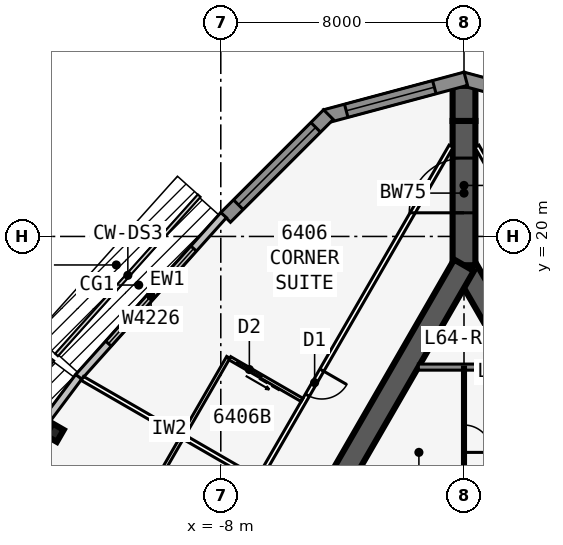
"""IFC4 building model, lengths in metres.
Left out: names, types, materials, properties, quantities, classifications, styles, units other than length and angle.
Written with IfcOpenShell. Run it as: python <this file> out.ifc"""

import sys

from ifc_helpers import new_model, si_unit, direction, frame, frame_2d, origin, origin_2d, place, context, subcontext, project, spatial, polyline, rectangle, i_section, outline, extrude, element, fill, save


model = new_model("IFC4")
c1 = context("Model", 3, precision=1e-05, world=origin(), true_north=direction((0.0, 1.0)))
c2 = subcontext(c1, "Body", "Model", "MODEL_VIEW")
j1 = project(units=[si_unit("LENGTHUNIT", "METRE"), si_unit("PLANEANGLEUNIT", "RADIAN")], contexts=[c1])
p1 = place(None, origin())
s1 = spatial("IfcSite", under=j1, at=p1, CompositionType="ELEMENT")
p2 = place(p1, origin())
s2 = spatial("IfcBuilding", under=s1, at=p2, CompositionType="ELEMENT")
p3 = place(p2, frame((0.0, 0.0, 242.9)))
s3 = spatial("IfcBuildingStorey", under=s2, at=p3, CompositionType="ELEMENT", Elevation=242.9)
p4 = place(p3, frame((16.5, -9.526, 0.0), z_axis=(0.0, 0.0, 1.0), x_axis=(-0.499999749417, 0.866025548458, 0.0)))
e1 = element("IfcWall", 1, at=p4, inside=s3, PredefinedType="SHEAR", context=c2, shape_type="SweptSolid", body=[
    extrude(rectangle(XDim=33.0, YDim=0.75, at=frame_2d((16.5, 0.0))), origin(), (0.0, 0.0, 1.0), 3.6),
])
p5 = place(p4, frame((14.15, 0.0, 0.0)))
e2 = element("IfcOpeningElement", 2, at=p5, cuts=e1, PredefinedType="OPENING", context=c2, shape_type="SweptSolid", body=[
    extrude(rectangle(XDim=1.8, YDim=2.13, at=frame_2d((0.9, 1.065))), frame((0.0, 0.385, 0.0), z_axis=(0.0, -1.0, 0.0), x_axis=(1.0, 0.0, 0.0)), (0.0, 0.0, 1.0), 0.77),
])
p6 = place(p4, frame((12.6, 0.0, 0.0)))
e3 = element("IfcOpeningElement", 3, at=p6, cuts=e1, PredefinedType="OPENING", context=c2, shape_type="SweptSolid", body=[
    extrude(rectangle(XDim=1.0, YDim=2.13, at=frame_2d((0.5, 1.065))), frame((0.0, 0.385, 0.0), z_axis=(0.0, -1.0, 0.0), x_axis=(1.0, 0.0, 0.0)), (0.0, 0.0, 1.0), 0.77),
])
p7 = place(p3, frame((0.0, 19.052, 0.0), z_axis=(0.0, 0.0, 1.0), x_axis=(-0.499999749417, -0.866025548458, 0.0)))
e4 = element("IfcWall", 4, at=p7, inside=s3, PredefinedType="SHEAR", context=c2, shape_type="SweptSolid", body=[
    extrude(rectangle(XDim=33.0, YDim=0.75, at=frame_2d((16.5, 0.0))), origin(), (0.0, 0.0, 1.0), 3.6),
])
p8 = place(p7, frame((14.15, 0.0, 0.0)))
e5 = element("IfcOpeningElement", 5, at=p8, cuts=e4, PredefinedType="OPENING", context=c2, shape_type="SweptSolid", body=[
    extrude(rectangle(XDim=1.8, YDim=2.13, at=frame_2d((0.9, 1.065))), frame((0.0, 0.385, 0.0), z_axis=(0.0, -1.0, 0.0), x_axis=(1.0, 0.0, 0.0)), (0.0, 0.0, 1.0), 0.77),
])
p9 = place(p7, frame((12.6, 0.0, 0.0)))
e6 = element("IfcOpeningElement", 6, at=p9, cuts=e4, PredefinedType="OPENING", context=c2, shape_type="SweptSolid", body=[
    extrude(rectangle(XDim=1.0, YDim=2.13, at=frame_2d((0.5, 1.065))), frame((0.0, 0.385, 0.0), z_axis=(0.0, -1.0, 0.0), x_axis=(1.0, 0.0, 0.0)), (0.0, 0.0, 1.0), 0.77),
])
p10 = place(p3, frame((0.0, 19.052, 0.0), z_axis=(0.0, 0.0, 1.0), x_axis=(0.0, 1.0, 0.0)))
e7 = element("IfcWall", 7, at=p10, inside=s3, PredefinedType="SHEAR", context=c2, shape_type="SweptSolid", body=[
    extrude(rectangle(XDim=4.746, YDim=0.75, at=frame_2d((2.373, 0.0))), origin(), (0.0, 0.0, 1.0), 3.6),
])
p11 = place(p10, frame((1.725, 0.0, 0.0)))
e8 = element("IfcOpeningElement", 8, at=p11, cuts=e7, PredefinedType="OPENING", context=c2, shape_type="SweptSolid", body=[
    extrude(rectangle(XDim=1.8, YDim=2.13, at=frame_2d((0.9, 1.065))), frame((0.0, 0.385, 0.0), z_axis=(0.0, -1.0, 0.0), x_axis=(1.0, 0.0, 0.0)), (0.0, 0.0, 1.0), 0.77),
])
p12 = place(p3, frame((0.0, 23.799, 0.0), z_axis=(0.0, 0.0, 1.0), x_axis=(0.0, 1.0, 0.0)))
e9 = element("IfcWall", 9, at=p12, inside=s3, PredefinedType="SHEAR", context=c2, shape_type="SweptSolid", body=[
    extrude(rectangle(XDim=1.155, YDim=0.75, at=frame_2d((0.577, 0.0))), origin(), (0.0, 0.0, 1.0), 3.6),
])
p13 = place(p3, frame((-13.461, 13.545, 0.0), z_axis=(0.0, 0.0, 1.0), x_axis=(-0.866025403784, 0.5, 0.0)))
e10 = element("IfcColumn", 10, at=p13, inside=s3, PredefinedType="COLUMN", context=c2, shape_type="SweptSolid", body=[
    extrude(i_section(OverallWidth=0.419, OverallDepth=0.455, WebThickness=0.042, FlangeThickness=0.068, at=origin_2d()), origin(), (0.0, 0.0, 1.0), 3.6),
])
p14 = place(p3, frame((4.561, 23.948, 0.0), z_axis=(0.0, 0.0, 1.0), x_axis=(-0.965926628191, 0.258816052347, 0.0)))
e11 = element("IfcWall", 11, at=p14, inside=s3, PredefinedType="SOLIDWALL", context=c2, shape_type="SweptSolid", body=[
    extrude(outline(polyline([(4.781, 0.225), (4.722, 0.225), (4.303, 0.113), (4.273, 0.225), (0.0, 0.225), (0.0, -0.225), (4.781, -0.225), (4.781, 0.225)])), origin(), (0.0, 0.0, 1.0), 3.435),
])
p15 = place(p14, frame((0.711, 0.0, 0.45)))
e12 = element("IfcOpeningElement", 12, at=p15, cuts=e11, PredefinedType="OPENING", context=c2, shape_type="SweptSolid", body=[
    extrude(rectangle(XDim=3.0, YDim=2.6, at=frame_2d((1.5, 1.3))), frame((0.0, 0.235, 0.0), z_axis=(0.0, -1.0, 0.0), x_axis=(1.0, 0.0, 0.0)), (0.0, 0.0, 1.0), 0.47),
])
p16 = place(p3, frame((0.058, 25.186, 0.0), z_axis=(0.0, 0.0, 1.0), x_axis=(-0.965926628191, -0.258816052347, 0.0)))
e13 = element("IfcWall", 13, at=p16, inside=s3, PredefinedType="SOLIDWALL", context=c2, shape_type="SweptSolid", body=[
    extrude(outline(polyline([(4.781, 0.225), (0.509, 0.225), (0.479, 0.113), (0.059, 0.225), (0.0, 0.225), (0.0, -0.225), (4.781, -0.225), (4.781, 0.225)])), origin(), (0.0, 0.0, 1.0), 3.435),
])
p17 = place(p16, frame((1.07, 0.0, 0.45)))
e14 = element("IfcOpeningElement", 14, at=p17, cuts=e13, PredefinedType="OPENING", context=c2, shape_type="SweptSolid", body=[
    extrude(rectangle(XDim=3.0, YDim=2.6, at=frame_2d((1.5, 1.3))), frame((0.0, 0.235, 0.0), z_axis=(0.0, -1.0, 0.0), x_axis=(1.0, 0.0, 0.0)), (0.0, 0.0, 1.0), 0.47),
])
p18 = place(p3, frame((-4.46, 24.007, 0.0), z_axis=(0.0, 0.0, 1.0), x_axis=(-0.707106781187, -0.707106781187, 0.0)))
e15 = element("IfcWall", 15, at=p18, inside=s3, PredefinedType="SOLIDWALL", context=c2, shape_type="SweptSolid", body=[
    extrude(rectangle(XDim=4.781, YDim=0.45, at=frame_2d((2.391, 0.0))), origin(), (0.0, 0.0, 1.0), 3.435),
])
p19 = place(p18, frame((0.591, 0.0, 0.45)))
e16 = element("IfcOpeningElement", 16, at=p19, cuts=e15, PredefinedType="OPENING", context=c2, shape_type="SweptSolid", body=[
    extrude(rectangle(XDim=3.6, YDim=2.6, at=frame_2d((1.8, 1.3))), frame((0.0, 0.235, 0.0), z_axis=(0.0, -1.0, 0.0), x_axis=(1.0, 0.0, 0.0)), (0.0, 0.0, 1.0), 0.47),
])
p20 = place(p3, frame((-7.907, 20.701, 0.0), z_axis=(0.0, 0.0, 1.0), x_axis=(-0.667303550892, -0.744785855778, 0.0)))
e17 = element("IfcWall", 17, at=p20, inside=s3, PredefinedType="STANDARD", context=c2, shape_type="SweptSolid", body=[
    extrude(rectangle(XDim=7.153, YDim=0.25, at=frame_2d((3.576, 0.0))), origin(), (0.0, 0.0, 1.0), 3.435),
])
p21 = place(p20, frame((1.476, 0.0, 0.45)))
e18 = element("IfcOpeningElement", 18, at=p21, cuts=e17, PredefinedType="OPENING", context=c2, shape_type="SweptSolid", body=[
    extrude(rectangle(XDim=4.2, YDim=2.6, at=frame_2d((2.1, 1.3))), frame((0.0, 0.135, 0.0), z_axis=(0.0, -1.0, 0.0), x_axis=(1.0, 0.0, 0.0)), (0.0, 0.0, 1.0), 0.27),
])
p22 = place(p3, frame((-12.673, 15.382, 0.0), z_axis=(0.0, 0.0, 1.0), x_axis=(-0.599650843534, -0.800261748335, 0.0)))
e19 = element("IfcWall", 19, at=p22, inside=s3, PredefinedType="STANDARD", context=c2, shape_type="SweptSolid", body=[
    extrude(rectangle(XDim=2.014, YDim=0.25, at=frame_2d((1.007, 0.0))), origin(), (0.0, 0.0, 1.0), 3.435),
])
p23 = place(p3, frame((6.763, 11.988, 0.0), z_axis=(0.0, 0.0, 1.0), x_axis=(-0.49999585592, 0.866027796357, 0.0)))
e20 = element("IfcWall", 20, at=p23, inside=s3, PredefinedType="PARTITIONING", context=c2, shape_type="SweptSolid", body=[
    extrude(rectangle(XDim=12.677, YDim=0.15, at=frame_2d((6.338, 0.0))), origin(), (0.0, 0.0, 1.0), 3.435),
])
p24 = place(p23, frame((3.225, 0.0, 0.0)))
e21 = element("IfcOpeningElement", 21, at=p24, cuts=e20, PredefinedType="OPENING", context=c2, shape_type="SweptSolid", body=[
    extrude(rectangle(XDim=0.95, YDim=2.13, at=frame_2d((0.475, 1.065))), frame((0.0, 0.085, 0.0), z_axis=(0.0, -1.0, 0.0), x_axis=(1.0, 0.0, 0.0)), (0.0, 0.0, 1.0), 0.17),
])
p25 = place(p3, frame((-0.425, 22.966, 0.0), z_axis=(0.0, 0.0, 1.0), x_axis=(-0.500000265775, -0.866025250339, 0.0)))
e22 = element("IfcWall", 22, at=p25, inside=s3, PredefinedType="PARTITIONING", context=c2, shape_type="SweptSolid", body=[
    extrude(rectangle(XDim=39.354, YDim=0.15, at=frame_2d((19.677, 0.0))), origin(), (0.0, 0.0, 1.0), 3.435),
])
p26 = place(p25, frame((8.502, 0.0, 0.0)))
e23 = element("IfcOpeningElement", 23, at=p26, cuts=e22, PredefinedType="OPENING", context=c2, shape_type="SweptSolid", body=[
    extrude(rectangle(XDim=0.95, YDim=2.13, at=frame_2d((0.475, 1.065))), frame((0.0, 0.085, 0.0), z_axis=(0.0, -1.0, 0.0), x_axis=(1.0, 0.0, 0.0)), (0.0, 0.0, 1.0), 0.17),
])
p27 = place(p25, frame((15.902, 0.0, 0.0)))
e24 = element("IfcOpeningElement", 24, at=p27, cuts=e22, PredefinedType="OPENING", context=c2, shape_type="SweptSolid", body=[
    extrude(rectangle(XDim=0.95, YDim=2.13, at=frame_2d((0.475, 1.065))), frame((0.0, 0.085, 0.0), z_axis=(0.0, -1.0, 0.0), x_axis=(1.0, 0.0, 0.0)), (0.0, 0.0, 1.0), 0.17),
])
p28 = place(p25, frame((22.902, 0.0, 0.0)))
e25 = element("IfcOpeningElement", 25, at=p28, cuts=e22, PredefinedType="OPENING", context=c2, shape_type="SweptSolid", body=[
    extrude(rectangle(XDim=0.95, YDim=2.13, at=frame_2d((0.475, 1.065))), frame((0.0, 0.085, 0.0), z_axis=(0.0, -1.0, 0.0), x_axis=(1.0, 0.0, 0.0)), (0.0, 0.0, 1.0), 0.17),
])
p29 = place(p25, frame((29.902, 0.0, 0.0)))
e26 = element("IfcOpeningElement", 26, at=p29, cuts=e22, PredefinedType="OPENING", context=c2, shape_type="SweptSolid", body=[
    extrude(rectangle(XDim=0.95, YDim=2.13, at=frame_2d((0.475, 1.065))), frame((0.0, 0.085, 0.0), z_axis=(0.0, -1.0, 0.0), x_axis=(1.0, 0.0, 0.0)), (0.0, 0.0, 1.0), 0.17),
])
p30 = place(p3, frame((-6.829, 12.025, 0.0), z_axis=(0.0, 0.0, 1.0), x_axis=(-0.866029323189, 0.499993211332, 0.0)))
e27 = element("IfcWall", 27, at=p30, inside=s3, PredefinedType="PARTITIONING", context=c2, shape_type="SweptSolid", body=[
    extrude(rectangle(XDim=6.608, YDim=0.15, at=frame_2d((3.304, 0.0))), origin(), (0.0, 0.0, 1.0), 2.678),
])
p31 = place(p3, frame((-7.753, 16.023, 0.0), z_axis=(0.0, 0.0, 1.0), x_axis=(-0.499990139034, -0.866031096941, 0.0)))
e28 = element("IfcWall", 28, at=p31, inside=s3, PredefinedType="PLUMBINGWALL", context=c2, shape_type="SweptSolid", body=[
    extrude(rectangle(XDim=3.0, YDim=0.12, at=frame_2d((1.5, 0.0))), origin(), (0.0, 0.0, 1.0), 3.435),
])
p32 = place(p3, frame((-5.329, 14.623, 0.0), z_axis=(0.0, 0.0, 1.0), x_axis=(-0.865997131366, 0.500048966069, 0.0)))
e29 = element("IfcWall", 29, at=p32, inside=s3, PredefinedType="PLUMBINGWALL", context=c2, shape_type="SweptSolid", body=[
    extrude(rectangle(XDim=2.74, YDim=0.12, at=frame_2d((1.37, 0.0))), origin(), (0.0, 0.0, 1.0), 3.435),
])
p33 = place(p32, frame((1.55, 0.0, 0.0)))
e30 = element("IfcOpeningElement", 30, at=p33, cuts=e29, PredefinedType="OPENING", context=c2, shape_type="SweptSolid", body=[
    extrude(rectangle(XDim=0.9, YDim=2.13, at=frame_2d((0.45, 1.065))), frame((0.0, 0.07, 0.0), z_axis=(0.0, -1.0, 0.0), x_axis=(1.0, 0.0, 0.0)), (0.0, 0.0, 1.0), 0.14),
])
p34 = place(p3, frame((-9.253, 13.425, 0.0), z_axis=(0.0, 0.0, 1.0), x_axis=(-0.499990139034, -0.866031096941, 0.0)))
e31 = element("IfcWall", 31, at=p34, inside=s3, PredefinedType="PLUMBINGWALL", context=c2, shape_type="SweptSolid", body=[
    extrude(rectangle(XDim=3.0, YDim=0.12, at=frame_2d((1.5, 0.0))), origin(), (0.0, 0.0, 1.0), 3.435),
])
p35 = place(p3, frame((-1.501, 15.703, 0.0), z_axis=(0.0, 0.0, 1.0), x_axis=(1.0, 0.0, 0.0)))
e32 = element("IfcWall", 32, at=p35, inside=s3, PredefinedType="SOLIDWALL", context=c2, shape_type="SweptSolid", body=[
    extrude(rectangle(XDim=3.002, YDim=0.2, at=frame_2d((1.501, 0.0))), origin(), (0.0, 0.0, 1.0), 3.435),
])
p36 = place(p3, frame((0.0, 15.703, 0.0), z_axis=(0.0, 0.0, 1.0), x_axis=(0.0, -1.0, 0.0)))
e33 = element("IfcWall", 33, at=p36, inside=s3, PredefinedType="PARTITIONING", context=c2, shape_type="SweptSolid", body=[
    extrude(rectangle(XDim=3.925, YDim=0.1, at=frame_2d((1.963, 0.0))), origin(), (0.0, 0.0, 1.0), 3.435),
])
p37 = place(p36, frame((1.905, 0.0, 0.0)))
e34 = element("IfcOpeningElement", 34, at=p37, cuts=e33, PredefinedType="OPENING", context=c2, shape_type="SweptSolid", body=[
    extrude(rectangle(XDim=0.9, YDim=2.13, at=frame_2d((0.45, 1.065))), frame((0.0, 0.06, 0.0), z_axis=(0.0, -1.0, 0.0), x_axis=(1.0, 0.0, 0.0)), (0.0, 0.0, 1.0), 0.12),
])
p38 = place(p17, origin())
e35 = element("IfcWindow", 35, at=p38, inside=s3, PartitioningType="SINGLE_PANEL", PredefinedType="WINDOW", context=c2, shape_type="SweptSolid", body=[
    extrude(rectangle(XDim=3.0, YDim=2.6, at=frame_2d((1.5, 1.3))), frame((0.0, 0.03, 0.0), z_axis=(0.0, -1.0, 0.0), x_axis=(1.0, 0.0, 0.0)), (0.0, 0.0, 1.0), 0.06),
])
fill(e14, e35)
p39 = place(p19, origin())
e36 = element("IfcWindow", 36, at=p39, inside=s3, PartitioningType="SINGLE_PANEL", PredefinedType="WINDOW", context=c2, shape_type="SweptSolid", body=[
    extrude(rectangle(XDim=3.6, YDim=2.6, at=frame_2d((1.8, 1.3))), frame((0.0, 0.03, 0.0), z_axis=(0.0, -1.0, 0.0), x_axis=(1.0, 0.0, 0.0)), (0.0, 0.0, 1.0), 0.06),
])
fill(e16, e36)
p40 = place(p21, origin())
e37 = element("IfcWindow", 37, at=p40, inside=s3, PartitioningType="SINGLE_PANEL", PredefinedType="WINDOW", context=c2, shape_type="SweptSolid", body=[
    extrude(rectangle(XDim=4.2, YDim=2.6, at=frame_2d((2.1, 1.3))), frame((0.0, 0.03, 0.0), z_axis=(0.0, -1.0, 0.0), x_axis=(1.0, 0.0, 0.0)), (0.0, 0.0, 1.0), 0.06),
])
fill(e18, e37)
p41 = place(p33, origin())
e38 = element("IfcDoor", 38, at=p41, inside=s3, OperationType="SLIDING_TO_LEFT", PredefinedType="DOOR", context=c2, shape_type="SweptSolid", body=[
    extrude(rectangle(XDim=0.9, YDim=2.13, at=frame_2d((0.45, 1.065))), frame((0.0, 0.025, 0.0), z_axis=(0.0, -1.0, 0.0), x_axis=(1.0, 0.0, 0.0)), (0.0, 0.0, 1.0), 0.05),
])
fill(e30, e38)
p42 = place(p26, origin())
e39 = element("IfcDoor", 39, at=p42, inside=s3, OperationType="SINGLE_SWING_LEFT", PredefinedType="DOOR", context=c2, shape_type="SweptSolid", body=[
    extrude(rectangle(XDim=0.95, YDim=2.13, at=frame_2d((0.475, 1.065))), frame((0.0, 0.025, 0.0), z_axis=(0.0, -1.0, 0.0), x_axis=(1.0, 0.0, 0.0)), (0.0, 0.0, 1.0), 0.05),
])
fill(e23, e39)
p43 = place(p11, origin())
e40 = element("IfcDoor", 40, at=p43, inside=s3, OperationType="DOUBLE_DOOR_DOUBLE_SWING", PredefinedType="DOOR", context=c2, shape_type="SweptSolid", body=[
    extrude(rectangle(XDim=1.8, YDim=2.13, at=frame_2d((0.9, 1.065))), frame((0.0, 0.025, 0.0), z_axis=(0.0, -1.0, 0.0), x_axis=(1.0, 0.0, 0.0)), (0.0, 0.0, 1.0), 0.05),
])
fill(e8, e40)
p44 = place(p37, origin())
e41 = element("IfcDoor", 41, at=p44, inside=s3, OperationType="SINGLE_SWING_RIGHT", PredefinedType="DOOR", context=c2, shape_type="SweptSolid", body=[
    extrude(rectangle(XDim=0.9, YDim=2.13, at=frame_2d((0.45, 1.065))), frame((0.0, 0.025, 0.0), z_axis=(0.0, -1.0, 0.0), x_axis=(1.0, 0.0, 0.0)), (0.0, 0.0, 1.0), 0.05),
])
fill(e34, e41)
save(model, sys.argv[1])
